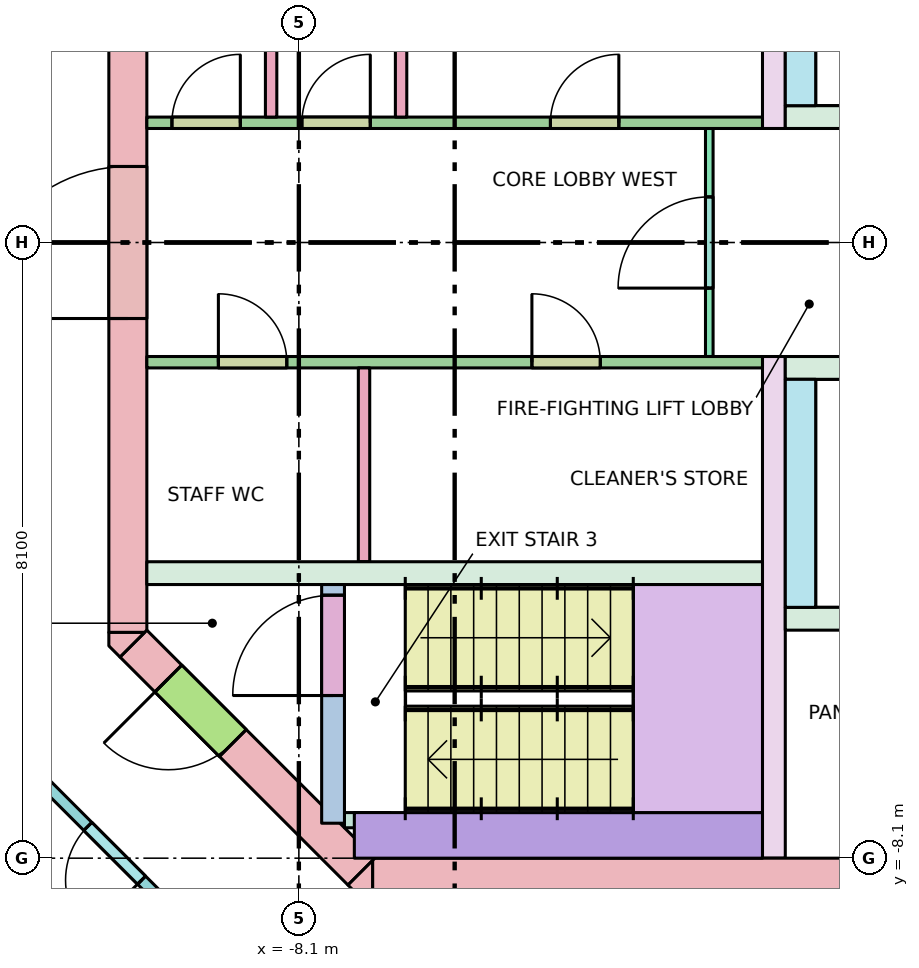
"""IFC4 building model, lengths in metres.
Left out: names, types, materials, properties, quantities, classifications, styles, units other than length and angle.
Written with IfcOpenShell. Run it as: python <this file> out.ifc"""

import sys

from ifc_helpers import new_model, si_unit, direction, frame, frame_2d, origin, place, context, subcontext, project, spatial, polyline, rectangle, outline, extrude, element, fill, save


model = new_model("IFC4")
c1 = context("Model", 3, precision=1e-05, world=origin(), true_north=direction((0.0, 1.0)))
c2 = subcontext(c1, "Body", "Model", "MODEL_VIEW")
j1 = project(units=[si_unit("LENGTHUNIT", "METRE"), si_unit("PLANEANGLEUNIT", "RADIAN")], contexts=[c1])
p1 = place(None, origin())
s1 = spatial("IfcSite", under=j1, at=p1, CompositionType="ELEMENT")
p2 = place(p1, origin())
s2 = spatial("IfcBuilding", under=s1, at=p2, CompositionType="ELEMENT")
p3 = place(p2, frame((0.0, 0.0, 253.8)))
s3 = spatial("IfcBuildingStorey", under=s2, at=p3, CompositionType="ELEMENT", Elevation=253.8)
p4 = place(p3, frame((-7.13, -8.35, -0.28), z_axis=(0.0, 0.0, 1.0), x_axis=(1.0, 0.0, 0.0)))
e1 = element("IfcWall", 1, at=p4, inside=s3, PredefinedType="SHEAR", context=c2, shape_type="SweptSolid", body=[
    extrude(rectangle(XDim=14.26, YDim=0.5, at=frame_2d((7.13, 0.0))), origin(), (0.0, 0.0, 1.0), 3.7),
])
p5 = place(p4, frame((8.08, 0.0, 0.28)))
e2 = element("IfcOpeningElement", 2, at=p5, cuts=e1, PredefinedType="OPENING", context=c2, shape_type="SweptSolid", body=[
    extrude(rectangle(XDim=0.7, YDim=2.1, at=frame_2d((0.35, 1.05))), frame((0.0, 0.26, 0.0), z_axis=(0.0, -1.0, 0.0), x_axis=(1.0, 0.0, 0.0)), (0.0, 0.0, 1.0), 0.52),
])
p6 = place(p4, frame((6.205, 0.0, 0.28)))
e3 = element("IfcOpeningElement", 3, at=p6, cuts=e1, PredefinedType="OPENING", context=c2, shape_type="SweptSolid", body=[
    extrude(rectangle(XDim=0.9, YDim=2.1, at=frame_2d((0.45, 1.05))), frame((0.0, 0.26, 0.0), z_axis=(0.0, -1.0, 0.0), x_axis=(1.0, 0.0, 0.0)), (0.0, 0.0, 1.0), 0.52),
])
p7 = place(p4, frame((9.967, 0.0, 0.28)))
e4 = element("IfcOpeningElement", 4, at=p7, cuts=e1, PredefinedType="OPENING", context=c2, shape_type="SweptSolid", body=[
    extrude(rectangle(XDim=0.9, YDim=2.1, at=frame_2d((0.45, 1.05))), frame((0.0, 0.26, 0.0), z_axis=(0.0, -1.0, 0.0), x_axis=(1.0, 0.0, 0.0)), (0.0, 0.0, 1.0), 0.52),
])
p8 = place(p4, frame((12.567, 0.0, 0.28)))
e5 = element("IfcOpeningElement", 5, at=p8, cuts=e1, PredefinedType="OPENING", context=c2, shape_type="SweptSolid", body=[
    extrude(rectangle(XDim=0.9, YDim=2.1, at=frame_2d((0.45, 1.05))), frame((0.0, 0.26, 0.0), z_axis=(0.0, -1.0, 0.0), x_axis=(1.0, 0.0, 0.0)), (0.0, 0.0, 1.0), 0.52),
])
p9 = place(p3, frame((-10.35, -5.13, -0.28), z_axis=(0.0, 0.0, 1.0), x_axis=(0.0, 1.0, 0.0)))
e6 = element("IfcWall", 6, at=p9, inside=s3, PredefinedType="SHEAR", context=c2, shape_type="SweptSolid", body=[
    extrude(rectangle(XDim=10.26, YDim=0.5, at=frame_2d((5.13, 0.0))), origin(), (0.0, 0.0, 1.0), 3.7),
])
p10 = place(p9, frame((4.13, 0.0, 0.28)))
e7 = element("IfcOpeningElement", 7, at=p10, cuts=e6, PredefinedType="OPENING", context=c2, shape_type="SweptSolid", body=[
    extrude(rectangle(XDim=2.0, YDim=2.1, at=frame_2d((1.0, 1.05))), frame((0.0, 0.26, 0.0), z_axis=(0.0, -1.0, 0.0), x_axis=(1.0, 0.0, 0.0)), (0.0, 0.0, 1.0), 0.52),
])
p11 = place(p3, frame((-7.277, -8.277, -0.28), z_axis=(0.0, 0.0, 1.0), x_axis=(-0.707106781187, 0.707106781187, 0.0)))
e8 = element("IfcWall", 8, at=p11, inside=s3, PredefinedType="SHEAR", context=c2, shape_type="SweptSolid", body=[
    extrude(rectangle(XDim=4.243, YDim=0.5, at=frame_2d((2.121, 0.0))), origin(), (0.0, 0.0, 1.0), 3.7),
])
p12 = place(p11, frame((2.393, 0.0, 0.28)))
e9 = element("IfcOpeningElement", 9, at=p12, cuts=e8, PredefinedType="OPENING", context=c2, shape_type="SweptSolid", body=[
    extrude(rectangle(XDim=1.2, YDim=2.1, at=frame_2d((0.6, 1.05))), frame((0.0, 0.26, 0.0), z_axis=(0.0, -1.0, 0.0), x_axis=(1.0, 0.0, 0.0)), (0.0, 0.0, 1.0), 0.52),
])
p13 = place(p3, frame((0.0, 0.0, -0.28)))
e10 = element("IfcWall", 10, at=p13, inside=s3, PredefinedType="SHEAR", context=c2, shape_type="SweptSolid", body=[
    extrude(outline(polyline([(-7.307, -8.6), (-7.454, -8.454), (-7.13, -8.13), (-7.13, -8.6), (-7.307, -8.6)])), origin(), (0.0, 0.0, 1.0), 3.7),
])
p14 = place(p3, frame((0.0, 0.0, -0.28)))
e11 = element("IfcWall", 11, at=p14, inside=s3, PredefinedType="SHEAR", context=c2, shape_type="SweptSolid", body=[
    extrude(outline(polyline([(-10.6, -5.307), (-10.6, -5.13), (-10.13, -5.13), (-10.454, -5.454), (-10.6, -5.307)])), origin(), (0.0, 0.0, 1.0), 3.7),
])
p15 = place(p3, frame((-10.1, -4.35, 0.0), z_axis=(0.0, 0.0, 1.0), x_axis=(1.0, 0.0, 0.0)))
e12 = element("IfcWall", 12, at=p15, inside=s3, PredefinedType="SOLIDWALL", context=c2, shape_type="SweptSolid", body=[
    extrude(rectangle(XDim=8.1, YDim=0.3, at=frame_2d((4.05, 0.0))), origin(), (0.0, 0.0, 1.0), 3.42),
])
for number, where, z_axis, x_axis in (
    (13, (-1.85, 1.5, 0.0), (0.0, 0.0, 1.0), (0.0, 1.0, 0.0)),
    (14, (-1.85, -8.1, 0.0), (0.0, 0.0, 1.0), (0.0, 1.0, 0.0)),
):
    element("IfcWall", number, at=place(p3, frame(where, z_axis=z_axis, x_axis=x_axis)), inside=s3, PredefinedType="SHEAR", context=c2, shape_type="SweptSolid", body=[
        extrude(rectangle(XDim=6.6, YDim=0.3, at=frame_2d((3.3, 0.0))), origin(), (0.0, 0.0, 1.0), 3.42),
    ])
p16 = place(p3, frame((-1.7, 1.65, 0.0), z_axis=(0.0, 0.0, 1.0), x_axis=(1.0, 0.0, 0.0)))
e15 = element("IfcWall", 15, at=p16, inside=s3, PredefinedType="SOLIDWALL", context=c2, shape_type="SweptSolid", body=[
    extrude(rectangle(XDim=3.4, YDim=0.3, at=frame_2d((1.7, 0.0))), origin(), (0.0, 0.0, 1.0), 3.42),
])
p17 = place(p16, frame((1.15, 0.0, 0.0)))
e16 = element("IfcOpeningElement", 16, at=p17, cuts=e15, PredefinedType="OPENING", context=c2, shape_type="SweptSolid", body=[
    extrude(rectangle(XDim=1.1, YDim=2.1, at=frame_2d((0.55, 1.05))), frame((0.0, 0.16, 0.0), z_axis=(0.0, -1.0, 0.0), x_axis=(1.0, 0.0, 0.0)), (0.0, 0.0, 1.0), 0.32),
])
p18 = place(p3, frame((-1.7, -1.65, 0.0), z_axis=(0.0, 0.0, 1.0), x_axis=(1.0, 0.0, 0.0)))
e17 = element("IfcWall", 17, at=p18, inside=s3, PredefinedType="SOLIDWALL", context=c2, shape_type="SweptSolid", body=[
    extrude(rectangle(XDim=3.4, YDim=0.3, at=frame_2d((1.7, 0.0))), origin(), (0.0, 0.0, 1.0), 3.42),
])
p19 = place(p18, frame((1.15, 0.0, 0.0)))
e18 = element("IfcOpeningElement", 18, at=p19, cuts=e17, PredefinedType="OPENING", context=c2, shape_type="SweptSolid", body=[
    extrude(rectangle(XDim=1.1, YDim=2.1, at=frame_2d((0.55, 1.05))), frame((0.0, 0.16, 0.0), z_axis=(0.0, -1.0, 0.0), x_axis=(1.0, 0.0, 0.0)), (0.0, 0.0, 1.0), 0.32),
])
for number, where, z_axis, x_axis in (
    (19, (-1.5, 1.8, 0.0), (0.0, 0.0, 1.0), (0.0, 1.0, 0.0)),
    (20, (-1.5, -4.8, 0.0), (0.0, 0.0, 1.0), (0.0, 1.0, 0.0)),
):
    element("IfcWall", number, at=place(p3, frame(where, z_axis=z_axis, x_axis=x_axis)), inside=s3, PredefinedType="SOLIDWALL", context=c2, shape_type="SweptSolid", body=[
        extrude(rectangle(XDim=3.0, YDim=0.4, at=frame_2d((1.5, 0.0))), origin(), (0.0, 0.0, 1.0), 3.42),
    ])
p20 = place(p3, frame((-1.7, -4.95, 0.0), z_axis=(0.0, 0.0, 1.0), x_axis=(1.0, 0.0, 0.0)))
e21 = element("IfcWall", 21, at=p20, inside=s3, PredefinedType="SOLIDWALL", context=c2, shape_type="SweptSolid", body=[
    extrude(rectangle(XDim=3.4, YDim=0.3, at=frame_2d((1.7, 0.0))), origin(), (0.0, 0.0, 1.0), 3.42),
])
p21 = place(p3, frame((-7.65, -7.64, 0.0), z_axis=(0.0, 0.0, 1.0), x_axis=(0.0, 1.0, 0.0)))
e22 = element("IfcWall", 22, at=p21, inside=s3, PredefinedType="SHEAR", context=c2, shape_type="SweptSolid", body=[
    extrude(rectangle(XDim=3.14, YDim=0.3, at=frame_2d((1.57, 0.0))), origin(), (0.0, 0.0, 1.0), 3.42),
])
p22 = place(p21, frame((1.68, 0.0, 0.0)))
e23 = element("IfcOpeningElement", 23, at=p22, cuts=e22, PredefinedType="OPENING", context=c2, shape_type="SweptSolid", body=[
    extrude(rectangle(XDim=1.32, YDim=2.1, at=frame_2d((0.66, 1.05))), frame((0.0, 0.16, 0.0), z_axis=(0.0, -1.0, 0.0), x_axis=(1.0, 0.0, 0.0)), (0.0, 0.0, 1.0), 0.32),
])
p23 = place(p3, frame((-7.5, -7.6, 0.0), z_axis=(0.0, 0.0, 1.0), x_axis=(1.0, 0.0, 0.0)))
e24 = element("IfcWall", 24, at=p23, inside=s3, PredefinedType="SHEAR", context=c2, shape_type="SweptSolid", body=[
    extrude(rectangle(XDim=0.6, YDim=0.2, at=frame_2d((0.3, 0.0))), origin(), (0.0, 0.0, 1.0), 3.42),
])
p24 = place(p3, frame((-7.37, -7.8, 0.0), z_axis=(0.0, 0.0, 1.0), x_axis=(1.0, 0.0, 0.0)))
e25 = element("IfcWall", 25, at=p24, inside=s3, PredefinedType="SHEAR", context=c2, shape_type="SweptSolid", body=[
    extrude(rectangle(XDim=5.37, YDim=0.6, at=frame_2d((2.685, 0.0))), origin(), (0.0, 0.0, 1.0), 3.42),
])
p25 = place(p3, frame((-2.7, -1.5, 0.0), z_axis=(0.0, 0.0, 1.0), x_axis=(0.0, 1.0, 0.0)))
e26 = element("IfcWall", 26, at=p25, inside=s3, PredefinedType="PARTITIONING", context=c2, shape_type="SweptSolid", body=[
    extrude(rectangle(XDim=3.0, YDim=0.1, at=frame_2d((1.5, 0.0))), origin(), (0.0, 0.0, 1.0), 3.42),
])
p26 = place(p25, frame((0.9, 0.0, 0.0)))
e27 = element("IfcOpeningElement", 27, at=p26, cuts=e26, PredefinedType="OPENING", context=c2, shape_type="SweptSolid", body=[
    extrude(rectangle(XDim=1.2, YDim=2.1, at=frame_2d((0.6, 1.05))), frame((0.0, 0.06, 0.0), z_axis=(0.0, -1.0, 0.0), x_axis=(1.0, 0.0, 0.0)), (0.0, 0.0, 1.0), 0.12),
])
for number, where, z_axis, x_axis in (
    (28, (-8.465, 1.65, 0.0), (0.0, 0.0, 1.0), (0.0, 1.0, 0.0)),
    (29, (-6.755, 1.65, 0.0), (0.0, 0.0, 1.0), (0.0, 1.0, 0.0)),
    (30, (-7.242, -4.2, 0.0), (0.0, 0.0, 1.0), (0.0, 1.0, 0.0)),
):
    element("IfcWall", number, at=place(p3, frame(where, z_axis=z_axis, x_axis=x_axis)), inside=s3, PredefinedType="PARTITIONING", context=c2, shape_type="SweptSolid", body=[
        extrude(rectangle(XDim=2.55, YDim=0.15, at=frame_2d((1.275, 0.0))), origin(), (0.0, 0.0, 1.0), 3.42),
    ])
p27 = place(p3, frame((-10.1, 1.575, 0.0), z_axis=(0.0, 0.0, 1.0), x_axis=(1.0, 0.0, 0.0)))
e31 = element("IfcWall", 31, at=p27, inside=s3, PredefinedType="PARTITIONING", context=c2, shape_type="SweptSolid", body=[
    extrude(rectangle(XDim=8.1, YDim=0.15, at=frame_2d((4.05, 0.0))), origin(), (0.0, 0.0, 1.0), 3.42),
])
p28 = place(p27, frame((0.33, 0.0, 0.0)))
e32 = element("IfcOpeningElement", 32, at=p28, cuts=e31, PredefinedType="OPENING", context=c2, shape_type="SweptSolid", body=[
    extrude(rectangle(XDim=0.9, YDim=2.1, at=frame_2d((0.45, 1.05))), frame((0.0, 0.085, 0.0), z_axis=(0.0, -1.0, 0.0), x_axis=(1.0, 0.0, 0.0)), (0.0, 0.0, 1.0), 0.17),
])
p29 = place(p27, frame((2.04, 0.0, 0.0)))
e33 = element("IfcOpeningElement", 33, at=p29, cuts=e31, PredefinedType="OPENING", context=c2, shape_type="SweptSolid", body=[
    extrude(rectangle(XDim=0.9, YDim=2.1, at=frame_2d((0.45, 1.05))), frame((0.0, 0.085, 0.0), z_axis=(0.0, -1.0, 0.0), x_axis=(1.0, 0.0, 0.0)), (0.0, 0.0, 1.0), 0.17),
])
p30 = place(p27, frame((5.31, 0.0, 0.0)))
e34 = element("IfcOpeningElement", 34, at=p30, cuts=e31, PredefinedType="OPENING", context=c2, shape_type="SweptSolid", body=[
    extrude(rectangle(XDim=0.9, YDim=2.1, at=frame_2d((0.45, 1.05))), frame((0.0, 0.085, 0.0), z_axis=(0.0, -1.0, 0.0), x_axis=(1.0, 0.0, 0.0)), (0.0, 0.0, 1.0), 0.17),
])
p31 = place(p3, frame((-10.1, -1.575, 0.0), z_axis=(0.0, 0.0, 1.0), x_axis=(1.0, 0.0, 0.0)))
e35 = element("IfcWall", 35, at=p31, inside=s3, PredefinedType="PARTITIONING", context=c2, shape_type="SweptSolid", body=[
    extrude(rectangle(XDim=8.1, YDim=0.15, at=frame_2d((4.05, 0.0))), origin(), (0.0, 0.0, 1.0), 3.42),
])
p32 = place(p31, frame((0.941, 0.0, 0.0)))
e36 = element("IfcOpeningElement", 36, at=p32, cuts=e35, PredefinedType="OPENING", context=c2, shape_type="SweptSolid", body=[
    extrude(rectangle(XDim=0.9, YDim=2.1, at=frame_2d((0.45, 1.05))), frame((0.0, 0.085, 0.0), z_axis=(0.0, -1.0, 0.0), x_axis=(1.0, 0.0, 0.0)), (0.0, 0.0, 1.0), 0.17),
])
p33 = place(p31, frame((5.066, 0.0, 0.0)))
e37 = element("IfcOpeningElement", 37, at=p33, cuts=e35, PredefinedType="OPENING", context=c2, shape_type="SweptSolid", body=[
    extrude(rectangle(XDim=0.9, YDim=2.1, at=frame_2d((0.45, 1.05))), frame((0.0, 0.085, 0.0), z_axis=(0.0, -1.0, 0.0), x_axis=(1.0, 0.0, 0.0)), (0.0, 0.0, 1.0), 0.17),
])
p34 = place(p3, frame((-8.121, -10.438, 0.0), z_axis=(0.0, 0.0, 1.0), x_axis=(-0.707106781187, 0.707106781187, 0.0)))
e38 = element("IfcWall", 38, at=p34, inside=s3, PredefinedType="PARTITIONING", context=c2, shape_type="SweptSolid", body=[
    extrude(rectangle(XDim=6.105, YDim=0.15, at=frame_2d((3.053, 0.0))), origin(), (0.0, 0.0, 1.0), 2.57),
])
p35 = place(p34, frame((2.897, 0.0, 0.0)))
e39 = element("IfcOpeningElement", 39, at=p35, cuts=e38, PredefinedType="OPENING", context=c2, shape_type="SweptSolid", body=[
    extrude(rectangle(XDim=1.0, YDim=2.1, at=frame_2d((0.5, 1.05))), frame((0.0, 0.085, 0.0), z_axis=(0.0, -1.0, 0.0), x_axis=(1.0, 0.0, 0.0)), (0.0, 0.0, 1.0), 0.17),
])
p36 = place(p34, frame((0.344, 0.0, 0.0)))
e40 = element("IfcOpeningElement", 40, at=p36, cuts=e38, PredefinedType="OPENING", context=c2, shape_type="SweptSolid", body=[
    extrude(rectangle(XDim=1.0, YDim=2.1, at=frame_2d((0.5, 1.05))), frame((0.0, 0.085, 0.0), z_axis=(0.0, -1.0, 0.0), x_axis=(1.0, 0.0, 0.0)), (0.0, 0.0, 1.0), 0.17),
])
p37 = place(p22, origin())
e41 = element("IfcDoor", 41, at=p37, inside=s3, OperationType="DOUBLE_DOOR_SINGLE_SWING", PredefinedType="DOOR", context=c2, shape_type="SweptSolid", body=[
    extrude(rectangle(XDim=1.32, YDim=2.1, at=frame_2d((0.66, 1.05))), frame((0.0, 0.025, 0.0), z_axis=(0.0, -1.0, 0.0), x_axis=(1.0, 0.0, 0.0)), (0.0, 0.0, 1.0), 0.05),
])
fill(e23, e41)
p38 = place(p12, origin())
e42 = element("IfcDoor", 42, at=p38, inside=s3, OperationType="SINGLE_SWING_RIGHT", PredefinedType="DOOR", context=c2, shape_type="SweptSolid", body=[
    extrude(rectangle(XDim=1.2, YDim=2.1, at=frame_2d((0.6, 1.05))), frame((0.0, 0.025, 0.0), z_axis=(0.0, -1.0, 0.0), x_axis=(1.0, 0.0, 0.0)), (0.0, 0.0, 1.0), 0.05),
])
fill(e9, e42)
p39 = place(p10, origin())
e43 = element("IfcDoor", 43, at=p39, inside=s3, OperationType="DOUBLE_DOOR_SINGLE_SWING", PredefinedType="DOOR", context=c2, shape_type="SweptSolid", body=[
    extrude(rectangle(XDim=2.0, YDim=2.1, at=frame_2d((1.0, 1.05))), frame((0.0, 0.025, 0.0), z_axis=(0.0, -1.0, 0.0), x_axis=(1.0, 0.0, 0.0)), (0.0, 0.0, 1.0), 0.05),
])
fill(e7, e43)
p40 = place(p26, origin())
e44 = element("IfcDoor", 44, at=p40, inside=s3, OperationType="SINGLE_SWING_LEFT", PredefinedType="DOOR", context=c2, shape_type="SweptSolid", body=[
    extrude(rectangle(XDim=1.2, YDim=2.1, at=frame_2d((0.6, 1.05))), frame((0.0, 0.025, 0.0), z_axis=(0.0, -1.0, 0.0), x_axis=(1.0, 0.0, 0.0)), (0.0, 0.0, 1.0), 0.05),
])
fill(e27, e44)
p41 = place(p28, origin())
e45 = element("IfcDoor", 45, at=p41, inside=s3, OperationType="SINGLE_SWING_RIGHT", PredefinedType="DOOR", context=c2, shape_type="SweptSolid", body=[
    extrude(rectangle(XDim=0.9, YDim=2.1, at=frame_2d((0.45, 1.05))), frame((0.0, 0.025, 0.0), z_axis=(0.0, -1.0, 0.0), x_axis=(1.0, 0.0, 0.0)), (0.0, 0.0, 1.0), 0.05),
])
fill(e32, e45)
p42 = place(p29, origin())
e46 = element("IfcDoor", 46, at=p42, inside=s3, OperationType="SINGLE_SWING_RIGHT", PredefinedType="DOOR", context=c2, shape_type="SweptSolid", body=[
    extrude(rectangle(XDim=0.9, YDim=2.1, at=frame_2d((0.45, 1.05))), frame((0.0, 0.025, 0.0), z_axis=(0.0, -1.0, 0.0), x_axis=(1.0, 0.0, 0.0)), (0.0, 0.0, 1.0), 0.05),
])
fill(e33, e46)
p43 = place(p30, origin())
e47 = element("IfcDoor", 47, at=p43, inside=s3, OperationType="SINGLE_SWING_RIGHT", PredefinedType="DOOR", context=c2, shape_type="SweptSolid", body=[
    extrude(rectangle(XDim=0.9, YDim=2.1, at=frame_2d((0.45, 1.05))), frame((0.0, 0.025, 0.0), z_axis=(0.0, -1.0, 0.0), x_axis=(1.0, 0.0, 0.0)), (0.0, 0.0, 1.0), 0.05),
])
fill(e34, e47)
p44 = place(p32, origin())
e48 = element("IfcDoor", 48, at=p44, inside=s3, OperationType="SINGLE_SWING_LEFT", PredefinedType="DOOR", context=c2, shape_type="SweptSolid", body=[
    extrude(rectangle(XDim=0.9, YDim=2.1, at=frame_2d((0.45, 1.05))), frame((0.0, 0.025, 0.0), z_axis=(0.0, -1.0, 0.0), x_axis=(1.0, 0.0, 0.0)), (0.0, 0.0, 1.0), 0.05),
])
fill(e36, e48)
p45 = place(p33, origin())
e49 = element("IfcDoor", 49, at=p45, inside=s3, OperationType="SINGLE_SWING_LEFT", PredefinedType="DOOR", context=c2, shape_type="SweptSolid", body=[
    extrude(rectangle(XDim=0.9, YDim=2.1, at=frame_2d((0.45, 1.05))), frame((0.0, 0.025, 0.0), z_axis=(0.0, -1.0, 0.0), x_axis=(1.0, 0.0, 0.0)), (0.0, 0.0, 1.0), 0.05),
])
fill(e37, e49)
p46 = place(p35, origin())
e50 = element("IfcDoor", 50, at=p46, inside=s3, OperationType="SINGLE_SWING_LEFT", PredefinedType="DOOR", context=c2, shape_type="SweptSolid", body=[
    extrude(rectangle(XDim=1.0, YDim=2.1, at=frame_2d((0.5, 1.05))), frame((0.0, 0.025, 0.0), z_axis=(0.0, -1.0, 0.0), x_axis=(1.0, 0.0, 0.0)), (0.0, 0.0, 1.0), 0.05),
])
fill(e39, e50)
save(model, sys.argv[1])
